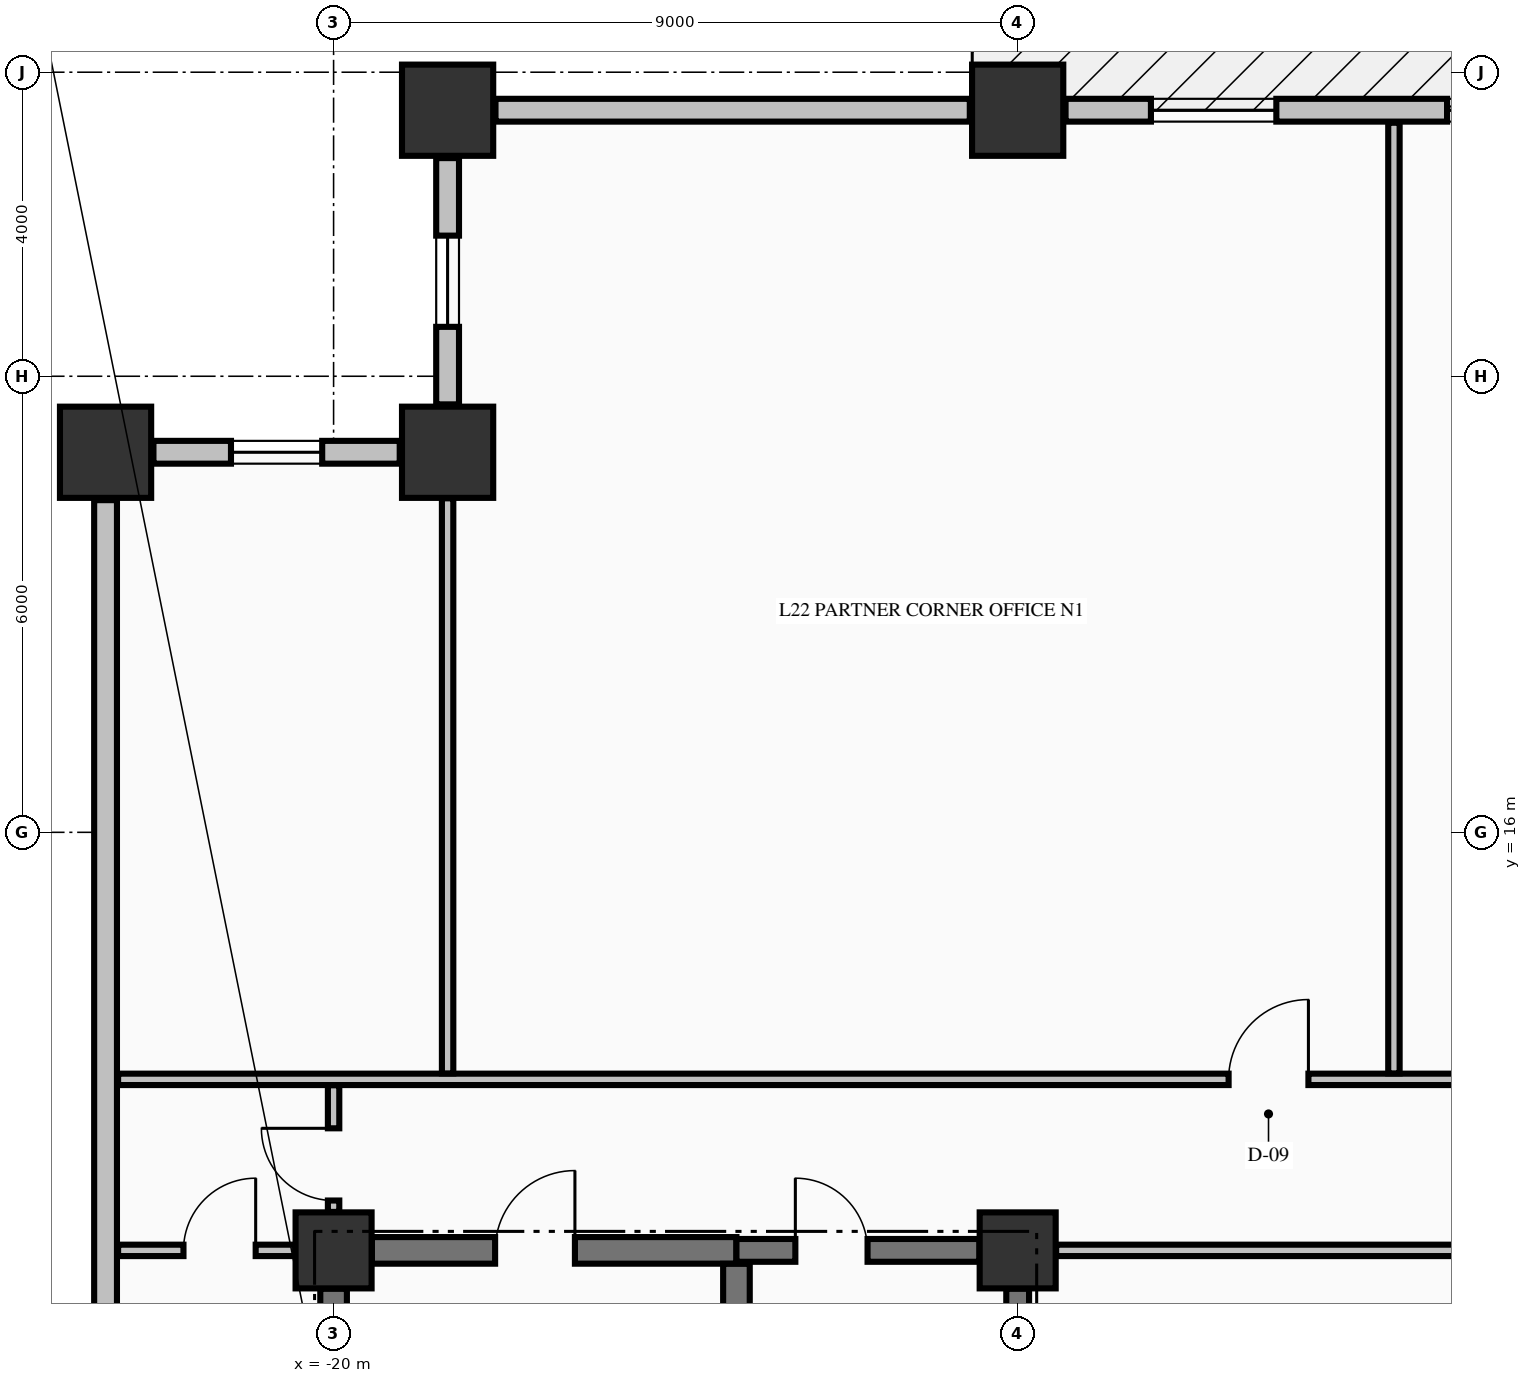
"""IFC4 building model, lengths in metres.
Left out: names, types, materials, properties, quantities, classifications, styles, units other than length and angle.
Written with IfcOpenShell. Run it as: python <this file> out.ifc"""

import sys

from ifc_helpers import new_model, si_unit, direction, frame, frame_2d, origin, origin_2d, place, context, subcontext, project, spatial, rectangle, extrude, element, fill, save


model = new_model("IFC4")
c1 = context("Model", 3, precision=1e-05, world=origin(), true_north=direction((0.0, 1.0)))
c2 = subcontext(c1, "Body", "Model", "MODEL_VIEW")
j1 = project(units=[si_unit("LENGTHUNIT", "METRE"), si_unit("PLANEANGLEUNIT", "RADIAN")], contexts=[c1])
p1 = place(None, origin())
s1 = spatial("IfcSite", under=j1, at=p1, CompositionType="ELEMENT")
p2 = place(p1, origin())
s2 = spatial("IfcBuilding", under=s1, at=p2, CompositionType="ELEMENT")
p3 = place(p2, frame((0.0, 0.0, 91.36)))
s3 = spatial("IfcBuildingStorey", under=s2, at=p3, CompositionType="ELEMENT", Elevation=91.36)
for number, where, z_axis, x_axis in (
    (1, (-18.5, 25.5, -0.25), (0.0, 0.0, 1.0), (1.0, 0.0, 0.0)),
    (2, (-11.0, 25.5, -0.25), (0.0, 0.0, 1.0), (1.0, 0.0, 0.0)),
    (3, (-23.0, 21.0, -0.25), (0.0, 0.0, 1.0), (1.0, 0.0, 0.0)),
    (4, (-18.5, 21.0, -0.25), (0.0, 0.0, 1.0), (1.0, 0.0, 0.0)),
):
    element("IfcColumn", number, at=place(p3, frame(where, z_axis=z_axis, x_axis=x_axis)), inside=s3, PredefinedType="COLUMN", context=c2, shape_type="SweptSolid", body=[
        extrude(rectangle(XDim=1.2, YDim=1.2, at=origin_2d()), origin(), (0.0, 0.0, 1.0), 3.57),
    ])
for number, where, z_axis, x_axis in (
    (5, (-20.0, 10.5, -0.25), (0.0, 0.0, 1.0), (1.0, 0.0, 0.0)),
    (6, (-11.0, 10.5, -0.25), (0.0, 0.0, 1.0), (1.0, 0.0, 0.0)),
):
    element("IfcColumn", number, at=place(p3, frame(where, z_axis=z_axis, x_axis=x_axis)), inside=s3, PredefinedType="COLUMN", context=c2, shape_type="SweptSolid", body=[
        extrude(rectangle(XDim=1.0, YDim=1.0, at=origin_2d()), origin(), (0.0, 0.0, 1.0), 3.57),
    ])
p4 = place(p3, frame((-18.5, 24.87, 0.0), z_axis=(0.0, 0.0, 1.0), x_axis=(0.0, -1.0, 0.0)))
e7 = element("IfcWall", 7, at=p4, inside=s3, PredefinedType="STANDARD", context=c2, shape_type="SweptSolid", body=[
    extrude(rectangle(XDim=3.24, YDim=0.3, at=frame_2d((1.62, 0.0))), origin(), (0.0, 0.0, 1.0), 2.712),
])
p5 = place(p4, frame((1.02, 0.0, 0.82)))
e8 = element("IfcOpeningElement", 8, at=p5, cuts=e7, PredefinedType="OPENING", context=c2, shape_type="SweptSolid", body=[
    extrude(rectangle(XDim=1.2, YDim=1.65, at=frame_2d((0.6, 0.825))), frame((0.0, 0.16, 0.0), z_axis=(0.0, -1.0, 0.0), x_axis=(1.0, 0.0, 0.0)), (0.0, 0.0, 1.0), 0.32),
])
p6 = place(p3, frame((-19.13, 21.0, 0.0), z_axis=(0.0, 0.0, 1.0), x_axis=(-1.0, 0.0, 0.0)))
e9 = element("IfcWall", 9, at=p6, inside=s3, PredefinedType="STANDARD", context=c2, shape_type="SweptSolid", body=[
    extrude(rectangle(XDim=3.24, YDim=0.3, at=frame_2d((1.62, 0.0))), origin(), (0.0, 0.0, 1.0), 2.712),
])
p7 = place(p6, frame((1.02, 0.0, 0.82)))
e10 = element("IfcOpeningElement", 10, at=p7, cuts=e9, PredefinedType="OPENING", context=c2, shape_type="SweptSolid", body=[
    extrude(rectangle(XDim=1.2, YDim=1.65, at=frame_2d((0.6, 0.825))), frame((0.0, 0.16, 0.0), z_axis=(0.0, -1.0, 0.0), x_axis=(1.0, 0.0, 0.0)), (0.0, 0.0, 1.0), 0.32),
])
p8 = place(p3, frame((-11.63, 25.5, 0.0), z_axis=(0.0, 0.0, 1.0), x_axis=(-1.0, 0.0, 0.0)))
e11 = element("IfcWall", 11, at=p8, inside=s3, PredefinedType="STANDARD", context=c2, shape_type="SweptSolid", body=[
    extrude(rectangle(XDim=6.24, YDim=0.3, at=frame_2d((3.12, 0.0))), origin(), (0.0, 0.0, 1.0), 2.712),
])
p9 = place(p3, frame((-0.63, 25.5, 0.0), z_axis=(0.0, 0.0, 1.0), x_axis=(-1.0, 0.0, 0.0)))
e12 = element("IfcWall", 12, at=p9, inside=s3, PredefinedType="STANDARD", context=c2, shape_type="SweptSolid", body=[
    extrude(rectangle(XDim=9.74, YDim=0.3, at=frame_2d((4.87, 0.0))), origin(), (0.0, 0.0, 1.0), 2.712),
])
p10 = place(p9, frame((0.2, 0.0, 0.0)))
e13 = element("IfcOpeningElement", 13, at=p10, cuts=e12, PredefinedType="OPENING", context=c2, shape_type="SweptSolid", body=[
    extrude(rectangle(XDim=1.1, YDim=2.15, at=frame_2d((0.55, 1.075))), frame((0.0, 0.16, 0.0), z_axis=(0.0, -1.0, 0.0), x_axis=(1.0, 0.0, 0.0)), (0.0, 0.0, 1.0), 0.32),
])
p11 = place(p9, frame((3.071, 0.0, 0.8)))
e14 = element("IfcOpeningElement", 14, at=p11, cuts=e12, PredefinedType="OPENING", context=c2, shape_type="SweptSolid", body=[
    extrude(rectangle(XDim=1.65, YDim=1.7, at=frame_2d((0.825, 0.85))), frame((0.0, 0.16, 0.0), z_axis=(0.0, -1.0, 0.0), x_axis=(1.0, 0.0, 0.0)), (0.0, 0.0, 1.0), 0.32),
])
p12 = place(p9, frame((6.967, 0.0, 0.8)))
e15 = element("IfcOpeningElement", 15, at=p12, cuts=e12, PredefinedType="OPENING", context=c2, shape_type="SweptSolid", body=[
    extrude(rectangle(XDim=1.65, YDim=1.7, at=frame_2d((0.825, 0.85))), frame((0.0, 0.16, 0.0), z_axis=(0.0, -1.0, 0.0), x_axis=(1.0, 0.0, 0.0)), (0.0, 0.0, 1.0), 0.32),
])
p13 = place(p3, frame((-23.0, 20.37, 0.0), z_axis=(0.0, 0.0, 1.0), x_axis=(0.0, -1.0, 0.0)))
e16 = element("IfcWall", 16, at=p13, inside=s3, PredefinedType="STANDARD", context=c2, shape_type="SweptSolid", body=[
    extrude(rectangle(XDim=10.74, YDim=0.3, at=frame_2d((5.37, 0.0))), origin(), (0.0, 0.0, 1.0), 2.712),
])
p14 = place(p3, frame((-19.496, 10.5, 0.0), z_axis=(0.0, 0.0, 1.0), x_axis=(1.0, 0.0, 0.0)))
e17 = element("IfcWall", 17, at=p14, inside=s3, PredefinedType="SHEAR", context=c2, shape_type="SweptSolid", body=[
    extrude(rectangle(XDim=4.796, YDim=0.35, at=frame_2d((2.398, 0.0))), origin(), (0.0, 0.0, 1.0), 3.32),
])
p15 = place(p14, frame((1.621, 0.0, 0.0)))
e18 = element("IfcOpeningElement", 18, at=p15, cuts=e17, PredefinedType="OPENING", context=c2, shape_type="SweptSolid", body=[
    extrude(rectangle(XDim=1.05, YDim=2.15, at=frame_2d((0.525, 1.075))), frame((0.0, 0.185, 0.0), z_axis=(0.0, -1.0, 0.0), x_axis=(1.0, 0.0, 0.0)), (0.0, 0.0, 1.0), 0.37),
])
p16 = place(p3, frame((-14.7, 10.5, 0.0), z_axis=(0.0, 0.0, 1.0), x_axis=(1.0, 0.0, 0.0)))
e19 = element("IfcWall", 19, at=p16, inside=s3, PredefinedType="SHEAR", context=c2, shape_type="SweptSolid", body=[
    extrude(rectangle(XDim=3.196, YDim=0.3, at=frame_2d((1.598, 0.0))), origin(), (0.0, 0.0, 1.0), 3.32),
])
p17 = place(p16, frame((0.775, 0.0, 0.0)))
e20 = element("IfcOpeningElement", 20, at=p17, cuts=e19, PredefinedType="OPENING", context=c2, shape_type="SweptSolid", body=[
    extrude(rectangle(XDim=0.95, YDim=2.15, at=frame_2d((0.475, 1.075))), frame((0.0, 0.16, 0.0), z_axis=(0.0, -1.0, 0.0), x_axis=(1.0, 0.0, 0.0)), (0.0, 0.0, 1.0), 0.32),
])
p18 = place(p3, frame((-22.835, 10.5, 0.0), z_axis=(0.0, 0.0, 1.0), x_axis=(1.0, 0.0, 0.0)))
e21 = element("IfcWall", 21, at=p18, inside=s3, PredefinedType="PARTITIONING", context=c2, shape_type="SweptSolid", body=[
    extrude(rectangle(XDim=2.329, YDim=0.15, at=frame_2d((1.165, 0.0))), origin(), (0.0, 0.0, 1.0), 3.32),
])
p19 = place(p18, frame((0.86, 0.0, 0.0)))
e22 = element("IfcOpeningElement", 22, at=p19, cuts=e21, PredefinedType="OPENING", context=c2, shape_type="SweptSolid", body=[
    extrude(rectangle(XDim=0.95, YDim=2.15, at=frame_2d((0.475, 1.075))), frame((0.0, 0.085, 0.0), z_axis=(0.0, -1.0, 0.0), x_axis=(1.0, 0.0, 0.0)), (0.0, 0.0, 1.0), 0.17),
])
p20 = place(p3, frame((-10.494, 10.5, 0.0), z_axis=(0.0, 0.0, 1.0), x_axis=(1.0, 0.0, 0.0)))
e23 = element("IfcWall", 23, at=p20, inside=s3, PredefinedType="PARTITIONING", context=c2, shape_type="SweptSolid", body=[
    extrude(rectangle(XDim=20.988, YDim=0.15, at=frame_2d((10.494, 0.0))), origin(), (0.0, 0.0, 1.0), 3.32),
])
p21 = place(p20, frame((8.194, 0.0, 0.0)))
e24 = element("IfcOpeningElement", 24, at=p21, cuts=e23, PredefinedType="OPENING", context=c2, shape_type="SweptSolid", body=[
    extrude(rectangle(XDim=1.1, YDim=2.15, at=frame_2d((0.55, 1.075))), frame((0.0, 0.085, 0.0), z_axis=(0.0, -1.0, 0.0), x_axis=(1.0, 0.0, 0.0)), (0.0, 0.0, 1.0), 0.17),
])
p22 = place(p3, frame((-22.835, 12.75, 0.0), z_axis=(0.0, 0.0, 1.0), x_axis=(1.0, 0.0, 0.0)))
e25 = element("IfcWall", 25, at=p22, inside=s3, PredefinedType="PARTITIONING", context=c2, shape_type="SweptSolid", body=[
    extrude(rectangle(XDim=50.67, YDim=0.15, at=frame_2d((25.335, 0.0))), origin(), (0.0, 0.0, 1.0), 3.32),
])
p23 = place(p22, frame((14.61, 0.0, 0.0)))
e26 = element("IfcOpeningElement", 26, at=p23, cuts=e25, PredefinedType="OPENING", context=c2, shape_type="SweptSolid", body=[
    extrude(rectangle(XDim=1.05, YDim=2.15, at=frame_2d((0.525, 1.075))), frame((0.0, 0.085, 0.0), z_axis=(0.0, -1.0, 0.0), x_axis=(1.0, 0.0, 0.0)), (0.0, 0.0, 1.0), 0.17),
])
p24 = place(p22, frame((17.91, 0.0, 0.0)))
e27 = element("IfcOpeningElement", 27, at=p24, cuts=e25, PredefinedType="OPENING", context=c2, shape_type="SweptSolid", body=[
    extrude(rectangle(XDim=1.05, YDim=2.15, at=frame_2d((0.525, 1.075))), frame((0.0, 0.085, 0.0), z_axis=(0.0, -1.0, 0.0), x_axis=(1.0, 0.0, 0.0)), (0.0, 0.0, 1.0), 0.17),
])
p25 = place(p22, frame((35.79, 0.0, 0.0)))
e28 = element("IfcOpeningElement", 28, at=p25, cuts=e25, PredefinedType="OPENING", context=c2, shape_type="SweptSolid", body=[
    extrude(rectangle(XDim=1.05, YDim=2.15, at=frame_2d((0.525, 1.075))), frame((0.0, 0.085, 0.0), z_axis=(0.0, -1.0, 0.0), x_axis=(1.0, 0.0, 0.0)), (0.0, 0.0, 1.0), 0.17),
])
p26 = place(p3, frame((-20.0, 0.504, 0.0), z_axis=(0.0, 0.0, 1.0), x_axis=(0.0, 1.0, 0.0)))
e29 = element("IfcWall", 29, at=p26, inside=s3, PredefinedType="SHEAR", context=c2, shape_type="SweptSolid", body=[
    extrude(rectangle(XDim=9.492, YDim=0.35, at=frame_2d((4.746, 0.0))), origin(), (0.0, 0.0, 1.0), 3.32),
])
p27 = place(p3, frame((-14.7, 5.852, 0.0), z_axis=(0.0, 0.0, 1.0), x_axis=(0.0, 1.0, 0.0)))
e30 = element("IfcWall", 30, at=p27, inside=s3, PredefinedType="SHEAR", context=c2, shape_type="SweptSolid", body=[
    extrude(rectangle(XDim=4.471, YDim=0.35, at=frame_2d((2.235, 0.0))), origin(), (0.0, 0.0, 1.0), 3.32),
])
p28 = place(p3, frame((-11.0, 5.852, 0.0), z_axis=(0.0, 0.0, 1.0), x_axis=(0.0, 1.0, 0.0)))
e31 = element("IfcWall", 31, at=p28, inside=s3, PredefinedType="SHEAR", context=c2, shape_type="SweptSolid", body=[
    extrude(rectangle(XDim=4.144, YDim=0.3, at=frame_2d((2.072, 0.0))), origin(), (0.0, 0.0, 1.0), 3.32),
])
p29 = place(p3, frame((-20.0, 11.006, 0.0), z_axis=(0.0, 0.0, 1.0), x_axis=(0.0, 1.0, 0.0)))
e32 = element("IfcWall", 32, at=p29, inside=s3, PredefinedType="PARTITIONING", context=c2, shape_type="SweptSolid", body=[
    extrude(rectangle(XDim=1.666, YDim=0.15, at=frame_2d((0.833, 0.0))), origin(), (0.0, 0.0, 1.0), 2.81),
])
p30 = place(p29, frame((0.15, 0.0, 0.0)))
e33 = element("IfcOpeningElement", 33, at=p30, cuts=e32, PredefinedType="OPENING", context=c2, shape_type="SweptSolid", body=[
    extrude(rectangle(XDim=0.95, YDim=2.15, at=frame_2d((0.475, 1.075))), frame((0.0, 0.085, 0.0), z_axis=(0.0, -1.0, 0.0), x_axis=(1.0, 0.0, 0.0)), (0.0, 0.0, 1.0), 0.17),
])
p31 = place(p3, frame((-18.5, 12.828, 0.0), z_axis=(0.0, 0.0, 1.0), x_axis=(0.0, 1.0, 0.0)))
e34 = element("IfcWall", 34, at=p31, inside=s3, PredefinedType="PARTITIONING", context=c2, shape_type="SweptSolid", body=[
    extrude(rectangle(XDim=7.566, YDim=0.15, at=frame_2d((3.783, 0.0))), origin(), (0.0, 0.0, 1.0), 3.32),
])
p32 = place(p3, frame((-6.05, 12.828, 0.0), z_axis=(0.0, 0.0, 1.0), x_axis=(0.0, 1.0, 0.0)))
e35 = element("IfcWall", 35, at=p32, inside=s3, PredefinedType="PARTITIONING", context=c2, shape_type="SweptSolid", body=[
    extrude(rectangle(XDim=12.507, YDim=0.15, at=frame_2d((6.253, 0.0))), origin(), (0.0, 0.0, 1.0), 3.32),
])
p33 = place(p5, origin())
e36 = element("IfcWindow", 36, at=p33, inside=s3, PartitioningType="SINGLE_PANEL", PredefinedType="WINDOW", context=c2, shape_type="SweptSolid", body=[
    extrude(rectangle(XDim=1.2, YDim=1.65, at=frame_2d((0.6, 0.825))), frame((0.0, 0.03, 0.0), z_axis=(0.0, -1.0, 0.0), x_axis=(1.0, 0.0, 0.0)), (0.0, 0.0, 1.0), 0.06),
])
fill(e8, e36)
p34 = place(p7, origin())
e37 = element("IfcWindow", 37, at=p34, inside=s3, PartitioningType="SINGLE_PANEL", PredefinedType="WINDOW", context=c2, shape_type="SweptSolid", body=[
    extrude(rectangle(XDim=1.2, YDim=1.65, at=frame_2d((0.6, 0.825))), frame((0.0, 0.03, 0.0), z_axis=(0.0, -1.0, 0.0), x_axis=(1.0, 0.0, 0.0)), (0.0, 0.0, 1.0), 0.06),
])
fill(e10, e37)
p35 = place(p11, origin())
e38 = element("IfcWindow", 38, at=p35, inside=s3, PartitioningType="SINGLE_PANEL", PredefinedType="WINDOW", context=c2, shape_type="SweptSolid", body=[
    extrude(rectangle(XDim=1.65, YDim=1.7, at=frame_2d((0.825, 0.85))), frame((0.0, 0.03, 0.0), z_axis=(0.0, -1.0, 0.0), x_axis=(1.0, 0.0, 0.0)), (0.0, 0.0, 1.0), 0.06),
])
fill(e14, e38)
p36 = place(p12, origin())
e39 = element("IfcWindow", 39, at=p36, inside=s3, PartitioningType="SINGLE_PANEL", PredefinedType="WINDOW", context=c2, shape_type="SweptSolid", body=[
    extrude(rectangle(XDim=1.65, YDim=1.7, at=frame_2d((0.825, 0.85))), frame((0.0, 0.03, 0.0), z_axis=(0.0, -1.0, 0.0), x_axis=(1.0, 0.0, 0.0)), (0.0, 0.0, 1.0), 0.06),
])
fill(e15, e39)
p37 = place(p17, origin())
e40 = element("IfcDoor", 40, at=p37, inside=s3, OperationType="SINGLE_SWING_LEFT", PredefinedType="DOOR", context=c2, shape_type="SweptSolid", body=[
    extrude(rectangle(XDim=0.95, YDim=2.15, at=frame_2d((0.475, 1.075))), frame((0.0, 0.025, 0.0), z_axis=(0.0, -1.0, 0.0), x_axis=(1.0, 0.0, 0.0)), (0.0, 0.0, 1.0), 0.05),
])
fill(e20, e40)
p38 = place(p15, origin())
e41 = element("IfcDoor", 41, at=p38, inside=s3, OperationType="SINGLE_SWING_RIGHT", PredefinedType="DOOR", context=c2, shape_type="SweptSolid", body=[
    extrude(rectangle(XDim=1.05, YDim=2.15, at=frame_2d((0.525, 1.075))), frame((0.0, 0.025, 0.0), z_axis=(0.0, -1.0, 0.0), x_axis=(1.0, 0.0, 0.0)), (0.0, 0.0, 1.0), 0.05),
])
fill(e18, e41)
p39 = place(p23, origin())
e42 = element("IfcDoor", 42, at=p39, inside=s3, OperationType="SINGLE_SWING_RIGHT", PredefinedType="DOOR", context=c2, shape_type="SweptSolid", body=[
    extrude(rectangle(XDim=1.05, YDim=2.15, at=frame_2d((0.525, 1.075))), frame((0.0, 0.025, 0.0), z_axis=(0.0, -1.0, 0.0), x_axis=(1.0, 0.0, 0.0)), (0.0, 0.0, 1.0), 0.05),
])
fill(e26, e42)
p40 = place(p30, origin())
e43 = element("IfcDoor", 43, at=p40, inside=s3, OperationType="SINGLE_SWING_RIGHT", PredefinedType="DOOR", context=c2, shape_type="SweptSolid", body=[
    extrude(rectangle(XDim=0.95, YDim=2.15, at=frame_2d((0.475, 1.075))), frame((0.0, 0.025, 0.0), z_axis=(0.0, -1.0, 0.0), x_axis=(1.0, 0.0, 0.0)), (0.0, 0.0, 1.0), 0.05),
])
fill(e33, e43)
p41 = place(p19, origin())
e44 = element("IfcDoor", 44, at=p41, inside=s3, OperationType="SINGLE_SWING_RIGHT", PredefinedType="DOOR", context=c2, shape_type="SweptSolid", body=[
    extrude(rectangle(XDim=0.95, YDim=2.15, at=frame_2d((0.475, 1.075))), frame((0.0, 0.025, 0.0), z_axis=(0.0, -1.0, 0.0), x_axis=(1.0, 0.0, 0.0)), (0.0, 0.0, 1.0), 0.05),
])
fill(e22, e44)
save(model, sys.argv[1])
